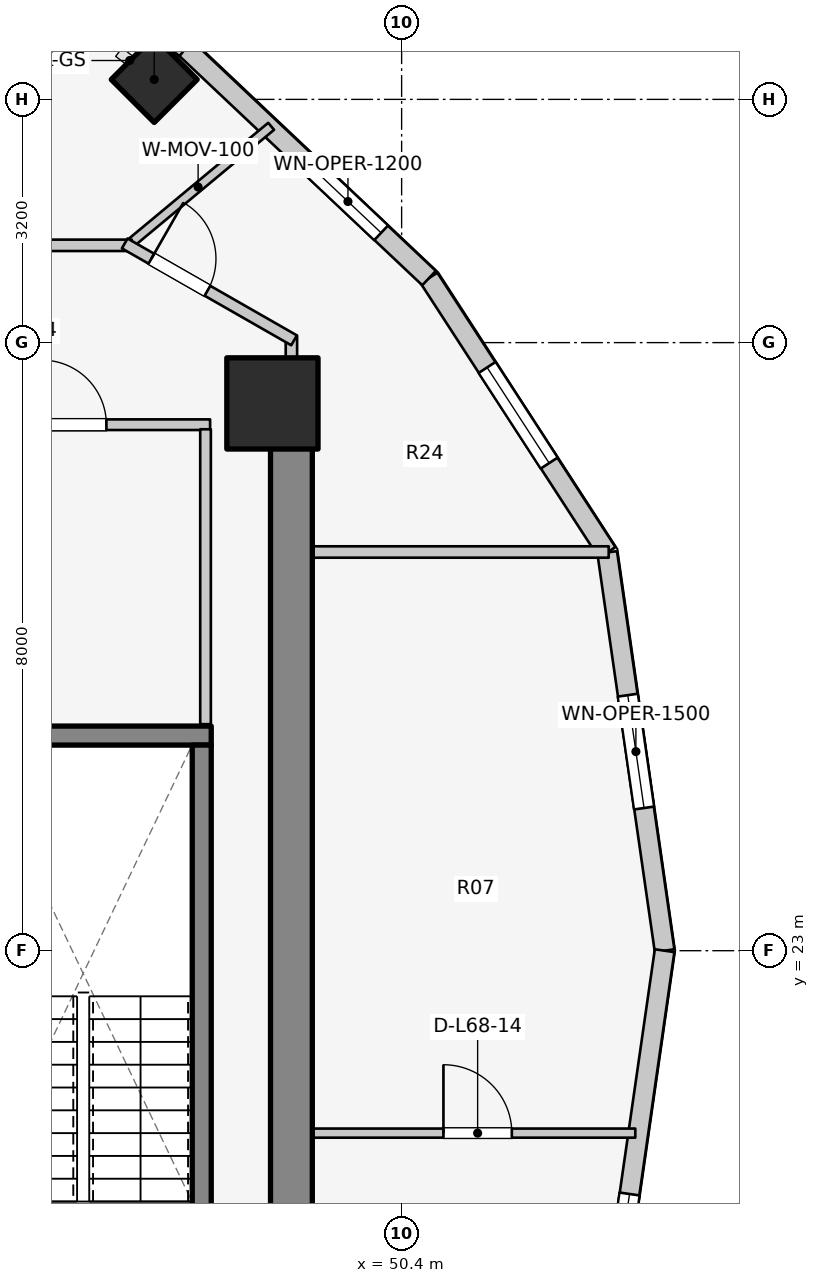
"""IFC4 building model, lengths in metres.
Left out: names, types, materials, properties, quantities, classifications, styles, units other than length and angle.
Written with IfcOpenShell. Run it as: python <this file> out.ifc"""

import sys

from ifc_helpers import new_model, si_unit, direction, frame, frame_2d, origin, origin_2d, place, context, subcontext, project, spatial, rectangle, extrude, element, fill, save


model = new_model("IFC4")
c1 = context("Model", 3, precision=1e-05, world=origin(), true_north=direction((0.0, 1.0)))
c2 = subcontext(c1, "Body", "Model", "MODEL_VIEW")
j1 = project(units=[si_unit("LENGTHUNIT", "METRE"), si_unit("PLANEANGLEUNIT", "RADIAN")], contexts=[c1])
p1 = place(None, origin())
s1 = spatial("IfcSite", under=j1, at=p1, CompositionType="ELEMENT")
p2 = place(p1, origin())
s2 = spatial("IfcBuilding", under=s1, at=p2, CompositionType="ELEMENT")
p3 = place(p2, frame((0.0, 0.0, 223.3)))
s3 = spatial("IfcBuildingStorey", under=s2, at=p3, CompositionType="ELEMENT", Elevation=223.3)
p4 = place(p3, frame((48.95, 17.05, 0.0), z_axis=(0.0, 0.0, 1.0), x_axis=(0.0, 1.0, 0.0)))
e1 = element("IfcWall", 1, at=p4, inside=s3, PredefinedType="SHEAR", context=c2, shape_type="SweptSolid", body=[
    extrude(rectangle(XDim=12.8, YDim=0.55, at=frame_2d((6.4, 0.0))), origin(), (0.0, 0.0, 1.0), 3.1),
])
p5 = place(p3, frame((44.525, 25.83, 0.0), z_axis=(0.0, 0.0, 1.0), x_axis=(1.0, 0.0, 0.0)))
e2 = element("IfcWall", 2, at=p5, inside=s3, PredefinedType="SOLIDWALL", context=c2, shape_type="SweptSolid", body=[
    extrude(rectangle(XDim=3.37, YDim=0.25, at=frame_2d((1.685, 0.0))), origin(), (0.0, 0.0, 1.0), 3.1),
])
p6 = place(p3, frame((47.77, 17.895, 0.0), z_axis=(0.0, 0.0, 1.0), x_axis=(0.0, 1.0, 0.0)))
e3 = element("IfcWall", 3, at=p6, inside=s3, PredefinedType="SOLIDWALL", context=c2, shape_type="SweptSolid", body=[
    extrude(rectangle(XDim=7.81, YDim=0.25, at=frame_2d((3.905, 0.0))), origin(), (0.0, 0.0, 1.0), 3.1),
])
p7 = place(p3, frame((48.7, 30.2, 0.0), z_axis=(0.0, 0.0, 1.0), x_axis=(1.0, 0.0, 0.0)))
e4 = element("IfcColumn", 4, at=p7, inside=s3, PredefinedType="COLUMN", context=c2, shape_type="SweptSolid", body=[
    extrude(rectangle(XDim=1.2, YDim=1.2, at=origin_2d()), origin(), (0.0, 0.0, 1.0), 3.1),
])
p8 = place(p3, frame((47.145, 34.462, 0.0), z_axis=(0.0, 0.0, 1.0), x_axis=(0.707106781187, 0.707106781187, 0.0)))
e5 = element("IfcColumn", 5, at=p8, inside=s3, PredefinedType="COLUMN", context=c2, shape_type="SweptSolid", body=[
    extrude(rectangle(XDim=0.8, YDim=0.8, at=origin_2d()), origin(), (0.0, 0.0, 1.0), 3.1),
])
p9 = place(p3, frame((53.86, 23.0, 0.0), z_axis=(0.0, 0.0, 1.0), x_axis=(-0.142712754019, 0.989764148593, 0.0)))
e6 = element("IfcWall", 6, at=p9, inside=s3, PredefinedType="STANDARD", context=c2, shape_type="SweptSolid", body=[
    extrude(rectangle(XDim=5.293, YDim=0.26, at=frame_2d((2.646, 0.0))), origin(), (0.0, 0.0, 1.0), 2.85),
])
p10 = place(p9, frame((1.896, 0.0, 0.75)))
e7 = element("IfcOpeningElement", 7, at=p10, cuts=e6, PredefinedType="OPENING", context=c2, shape_type="SweptSolid", body=[
    extrude(rectangle(XDim=1.5, YDim=1.6, at=frame_2d((0.75, 0.8))), frame((0.0, 0.14, 0.0), z_axis=(0.0, -1.0, 0.0), x_axis=(1.0, 0.0, 0.0)), (0.0, 0.0, 1.0), 0.28),
])
p11 = place(p3, frame((53.105, 28.239, 0.0), z_axis=(0.0, 0.0, 1.0), x_axis=(-0.544475908819, 0.838776480784, 0.0)))
e8 = element("IfcWall", 8, at=p11, inside=s3, PredefinedType="STANDARD", context=c2, shape_type="SweptSolid", body=[
    extrude(rectangle(XDim=4.305, YDim=0.26, at=frame_2d((2.152, 0.0))), origin(), (0.0, 0.0, 1.0), 2.85),
])
p12 = place(p11, frame((1.402, 0.0, 0.75)))
e9 = element("IfcOpeningElement", 9, at=p12, cuts=e8, PredefinedType="OPENING", context=c2, shape_type="SweptSolid", body=[
    extrude(rectangle(XDim=1.5, YDim=1.6, at=frame_2d((0.75, 0.8))), frame((0.0, 0.14, 0.0), z_axis=(0.0, -1.0, 0.0), x_axis=(1.0, 0.0, 0.0)), (0.0, 0.0, 1.0), 0.28),
])
p13 = place(p3, frame((50.761, 31.849, 0.0), z_axis=(0.0, 0.0, 1.0), x_axis=(-0.72731899451, 0.686299555752, 0.0)))
e10 = element("IfcWall", 10, at=p13, inside=s3, PredefinedType="STANDARD", context=c2, shape_type="SweptSolid", body=[
    extrude(rectangle(XDim=4.404, YDim=0.26, at=frame_2d((2.202, 0.0))), origin(), (0.0, 0.0, 1.0), 2.85),
])
p14 = place(p13, frame((0.867, 0.0, 0.75)))
e11 = element("IfcOpeningElement", 11, at=p14, cuts=e10, PredefinedType="OPENING", context=c2, shape_type="SweptSolid", body=[
    extrude(rectangle(XDim=1.2, YDim=1.5, at=frame_2d((0.6, 0.75))), frame((0.0, 0.14, 0.0), z_axis=(0.0, -1.0, 0.0), x_axis=(1.0, 0.0, 0.0)), (0.0, 0.0, 1.0), 0.28),
])
p15 = place(p3, frame((47.558, 34.872, 0.0), z_axis=(0.0, 0.0, 1.0), x_axis=(-0.790126214723, 0.612944177563, 0.0)))
e12 = element("IfcWall", 12, at=p15, inside=s3, PredefinedType="STANDARD", context=c2, shape_type="SweptSolid", body=[
    extrude(rectangle(XDim=4.667, YDim=0.26, at=frame_2d((2.333, 0.0))), origin(), (0.0, 0.0, 1.0), 2.85),
])
p16 = place(p3, frame((53.105, 17.761, 0.0), z_axis=(0.0, 0.0, 1.0), x_axis=(0.142712754019, 0.989764148593, 0.0)))
e13 = element("IfcWall", 13, at=p16, inside=s3, PredefinedType="STANDARD", context=c2, shape_type="SweptSolid", body=[
    extrude(rectangle(XDim=5.293, YDim=0.26, at=frame_2d((2.646, 0.0))), origin(), (0.0, 0.0, 1.0), 2.85),
])
p17 = place(p16, frame((0.859, 0.0, 0.75)))
e14 = element("IfcOpeningElement", 14, at=p17, cuts=e13, PredefinedType="OPENING", context=c2, shape_type="SweptSolid", body=[
    extrude(rectangle(XDim=1.2, YDim=1.5, at=frame_2d((0.6, 0.75))), frame((0.0, 0.14, 0.0), z_axis=(0.0, -1.0, 0.0), x_axis=(1.0, 0.0, 0.0)), (0.0, 0.0, 1.0), 0.28),
])
p18 = place(p3, frame((44.98, 29.92, 0.0), z_axis=(0.0, 0.0, 1.0), x_axis=(1.0, 0.0, 0.0)))
e15 = element("IfcWall", 15, at=p18, inside=s3, PredefinedType="PLUMBINGWALL", context=c2, shape_type="SweptSolid", body=[
    extrude(rectangle(XDim=2.9, YDim=0.14, at=frame_2d((1.45, 0.0))), origin(), (0.0, 0.0, 1.0), 2.855),
])
p19 = place(p18, frame((0.686, 0.0, 0.0)))
e16 = element("IfcOpeningElement", 16, at=p19, cuts=e15, PredefinedType="OPENING", context=c2, shape_type="SweptSolid", body=[
    extrude(rectangle(XDim=0.85, YDim=2.05, at=frame_2d((0.425, 1.025))), frame((0.0, 0.08, 0.0), z_axis=(0.0, -1.0, 0.0), x_axis=(1.0, 0.0, 0.0)), (0.0, 0.0, 1.0), 0.16),
])
p20 = place(p3, frame((47.82, 25.98, 0.0), z_axis=(0.0, 0.0, 1.0), x_axis=(0.0, 1.0, 0.0)))
e17 = element("IfcWall", 17, at=p20, inside=s3, PredefinedType="PLUMBINGWALL", context=c2, shape_type="SweptSolid", body=[
    extrude(rectangle(XDim=3.88, YDim=0.14, at=frame_2d((1.94, 0.0))), origin(), (0.0, 0.0, 1.0), 2.855),
])
p21 = place(p3, frame((48.95, 28.245, 0.0), z_axis=(0.0, 0.0, 1.0), x_axis=(1.0, 0.0, 0.0)))
e18 = element("IfcWall", 18, at=p21, inside=s3, PredefinedType="PARTITIONING", context=c2, shape_type="SweptSolid", body=[
    extrude(rectangle(XDim=4.175, YDim=0.15, at=frame_2d((2.087, 0.0))), origin(), (0.0, 0.0, 1.0), 2.855),
])
p22 = place(p3, frame((48.95, 20.6, 0.0), z_axis=(0.0, 0.0, 1.0), x_axis=(1.0, 0.0, 0.0)))
e19 = element("IfcWall", 19, at=p22, inside=s3, PredefinedType="MOVABLE", context=c2, shape_type="SweptSolid", body=[
    extrude(rectangle(XDim=4.524, YDim=0.12, at=frame_2d((2.262, 0.0))), origin(), (0.0, 0.0, 1.0), 2.855),
])
p23 = place(p22, frame((2.0, 0.0, 0.0)))
e20 = element("IfcOpeningElement", 20, at=p23, cuts=e19, PredefinedType="OPENING", context=c2, shape_type="SweptSolid", body=[
    extrude(rectangle(XDim=0.9, YDim=2.1, at=frame_2d((0.45, 1.05))), frame((0.0, 0.07, 0.0), z_axis=(0.0, -1.0, 0.0), x_axis=(1.0, 0.0, 0.0)), (0.0, 0.0, 1.0), 0.14),
])
p24 = place(p3, frame((48.95, 29.8, 0.0), z_axis=(0.0, 0.0, 1.0), x_axis=(0.0, 1.0, 0.0)))
e21 = element("IfcWall", 21, at=p24, inside=s3, PredefinedType="PARTITIONING", context=c2, shape_type="SweptSolid", body=[
    extrude(rectangle(XDim=1.29, YDim=0.15, at=frame_2d((0.645, 0.0))), origin(), (0.0, 0.0, 1.0), 2.855),
])
p25 = place(p3, frame((46.762, 32.248, 0.0), z_axis=(0.0, 0.0, 1.0), x_axis=(0.76890954941, 0.639357571962, 0.0)))
e22 = element("IfcWall", 22, at=p25, inside=s3, PredefinedType="MOVABLE", context=c2, shape_type="SweptSolid", body=[
    extrude(rectangle(XDim=2.499, YDim=0.12, at=frame_2d((1.25, 0.0))), origin(), (0.0, 0.0, 1.0), 2.22),
])
p26 = place(p3, frame((39.33, 32.28, 0.0), z_axis=(0.0, 0.0, 1.0), x_axis=(1.0, 0.0, 0.0)))
e23 = element("IfcWall", 23, at=p26, inside=s3, PredefinedType="PARTITIONING", context=c2, shape_type="SweptSolid", body=[
    extrude(rectangle(XDim=7.52, YDim=0.15, at=frame_2d((3.76, 0.0))), origin(), (0.0, 0.0, 1.0), 2.376),
])
p27 = place(p26, frame((5.22, 0.0, 0.0)))
e24 = element("IfcOpeningElement", 24, at=p27, cuts=e23, PredefinedType="OPENING", context=c2, shape_type="SweptSolid", body=[
    extrude(rectangle(XDim=0.9, YDim=2.1, at=frame_2d((0.45, 1.05))), frame((0.0, 0.085, 0.0), z_axis=(0.0, -1.0, 0.0), x_axis=(1.0, 0.0, 0.0)), (0.0, 0.0, 1.0), 0.17),
])
p28 = place(p3, frame((46.757, 32.305, 0.0), z_axis=(0.0, 0.0, 1.0), x_axis=(0.867991349648, -0.496579315857, 0.0)))
e25 = element("IfcWall", 25, at=p28, inside=s3, PredefinedType="PARTITIONING", context=c2, shape_type="SweptSolid", body=[
    extrude(rectangle(XDim=2.567, YDim=0.15, at=frame_2d((1.283, 0.0))), origin(), (0.0, 0.0, 1.0), 2.22),
])
p29 = place(p28, frame((0.404, 0.0, 0.0)))
e26 = element("IfcOpeningElement", 26, at=p29, cuts=e25, PredefinedType="OPENING", context=c2, shape_type="SweptSolid", body=[
    extrude(rectangle(XDim=0.85, YDim=2.05, at=frame_2d((0.425, 1.025))), frame((0.0, 0.085, 0.0), z_axis=(0.0, -1.0, 0.0), x_axis=(1.0, 0.0, 0.0)), (0.0, 0.0, 1.0), 0.17),
])
p30 = place(p10, origin())
e27 = element("IfcWindow", 27, at=p30, inside=s3, PartitioningType="SINGLE_PANEL", PredefinedType="WINDOW", context=c2, shape_type="SweptSolid", body=[
    extrude(rectangle(XDim=1.5, YDim=1.6, at=frame_2d((0.75, 0.8))), frame((0.0, 0.03, 0.0), z_axis=(0.0, -1.0, 0.0), x_axis=(1.0, 0.0, 0.0)), (0.0, 0.0, 1.0), 0.06),
])
fill(e7, e27)
p31 = place(p12, origin())
e28 = element("IfcWindow", 28, at=p31, inside=s3, PartitioningType="SINGLE_PANEL", PredefinedType="WINDOW", context=c2, shape_type="SweptSolid", body=[
    extrude(rectangle(XDim=1.5, YDim=1.6, at=frame_2d((0.75, 0.8))), frame((0.0, 0.03, 0.0), z_axis=(0.0, -1.0, 0.0), x_axis=(1.0, 0.0, 0.0)), (0.0, 0.0, 1.0), 0.06),
])
fill(e9, e28)
p32 = place(p14, origin())
e29 = element("IfcWindow", 29, at=p32, inside=s3, PartitioningType="SINGLE_PANEL", PredefinedType="WINDOW", context=c2, shape_type="SweptSolid", body=[
    extrude(rectangle(XDim=1.2, YDim=1.5, at=frame_2d((0.6, 0.75))), frame((0.0, 0.03, 0.0), z_axis=(0.0, -1.0, 0.0), x_axis=(1.0, 0.0, 0.0)), (0.0, 0.0, 1.0), 0.06),
])
fill(e11, e29)
p33 = place(p17, origin())
e30 = element("IfcWindow", 30, at=p33, inside=s3, PartitioningType="SINGLE_PANEL", PredefinedType="WINDOW", context=c2, shape_type="SweptSolid", body=[
    extrude(rectangle(XDim=1.2, YDim=1.5, at=frame_2d((0.6, 0.75))), frame((0.0, 0.03, 0.0), z_axis=(0.0, -1.0, 0.0), x_axis=(1.0, 0.0, 0.0)), (0.0, 0.0, 1.0), 0.06),
])
fill(e14, e30)
p34 = place(p19, origin())
e31 = element("IfcDoor", 31, at=p34, inside=s3, OperationType="SINGLE_SWING_LEFT", PredefinedType="DOOR", context=c2, shape_type="SweptSolid", body=[
    extrude(rectangle(XDim=0.85, YDim=2.05, at=frame_2d((0.425, 1.025))), frame((0.0, 0.025, 0.0), z_axis=(0.0, -1.0, 0.0), x_axis=(1.0, 0.0, 0.0)), (0.0, 0.0, 1.0), 0.05),
])
fill(e16, e31)
p35 = place(p23, origin())
e32 = element("IfcDoor", 32, at=p35, inside=s3, OperationType="SINGLE_SWING_LEFT", PredefinedType="DOOR", context=c2, shape_type="SweptSolid", body=[
    extrude(rectangle(XDim=0.9, YDim=2.1, at=frame_2d((0.45, 1.05))), frame((0.0, 0.025, 0.0), z_axis=(0.0, -1.0, 0.0), x_axis=(1.0, 0.0, 0.0)), (0.0, 0.0, 1.0), 0.05),
])
fill(e20, e32)
p36 = place(p29, origin())
e33 = element("IfcDoor", 33, at=p36, inside=s3, OperationType="SINGLE_SWING_LEFT", PredefinedType="DOOR", context=c2, shape_type="SweptSolid", body=[
    extrude(rectangle(XDim=0.85, YDim=2.05, at=frame_2d((0.425, 1.025))), frame((0.0, 0.025, 0.0), z_axis=(0.0, -1.0, 0.0), x_axis=(1.0, 0.0, 0.0)), (0.0, 0.0, 1.0), 0.05),
])
fill(e26, e33)
save(model, sys.argv[1])
